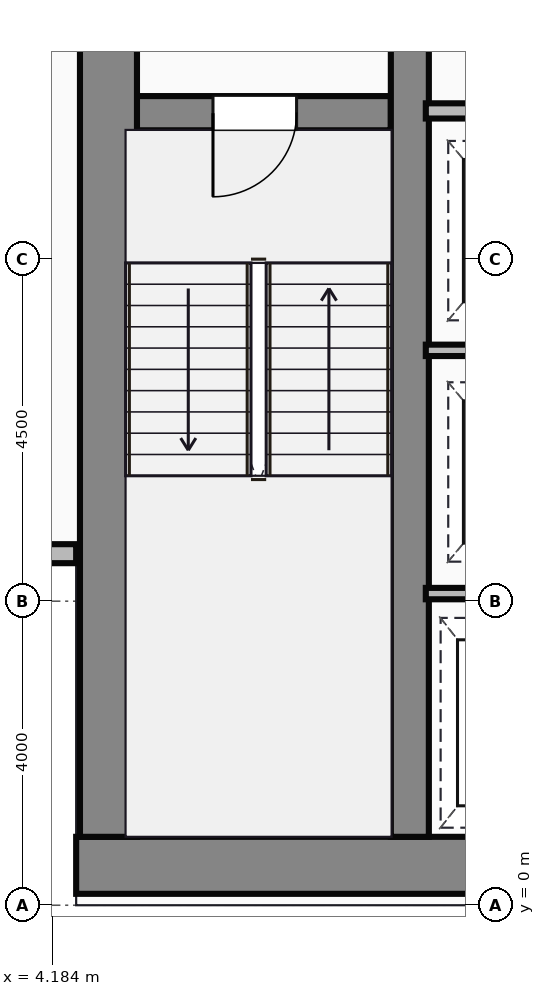
"""IFC4 building model, lengths in metres.
Left out: names, types, materials, properties, quantities, classifications, styles, units other than length and angle.
Written with IfcOpenShell. Run it as: python <this file> out.ifc"""

import sys

from ifc_helpers import new_model, si_unit, direction, frame, frame_2d, origin, place, context, subcontext, project, spatial, rectangle, extrude, source, transform, mapped, element, fill, save


model = new_model("IFC4")
c1 = context("Model", 3, precision=1e-05, world=origin(), true_north=direction((0.0, 1.0)))
c2 = subcontext(c1, "Body", "Model", "MODEL_VIEW")
j1 = project(units=[si_unit("LENGTHUNIT", "METRE"), si_unit("PLANEANGLEUNIT", "RADIAN")], contexts=[c1])
p1 = place(None, origin())
s1 = spatial("IfcSite", under=j1, at=p1, CompositionType="ELEMENT")
p2 = place(p1, origin())
s2 = spatial("IfcBuilding", under=s1, at=p2, CompositionType="ELEMENT")
p3 = place(p2, frame((0.0, 0.0, 114.2)))
s3 = spatial("IfcBuildingStorey", under=s2, at=p3, CompositionType="ELEMENT", Elevation=114.2)
m1 = source(origin(), c2, "Body", "SweptSolid", [
    extrude(rectangle(XDim=29.5, YDim=0.75, at=frame_2d((14.75, 0.0))), origin(), (0.0, 0.0, 1.0), 3.65),
])
p4 = place(p3, frame((4.5, 0.525, 0.0), z_axis=(0.0, 0.0, 1.0), x_axis=(1.0, 0.0, 0.0)))
e1 = element("IfcWall", 1, at=p4, inside=s3, PredefinedType="SHEAR", context=c2, shape_type="MappedRepresentation", body=[
    mapped(m1, transform((0.0, 0.0, 0.0))),
])
m2 = source(origin(), c2, "Body", "SweptSolid", [
    extrude(rectangle(XDim=13.1, YDim=0.75, at=frame_2d((6.55, 0.0))), origin(), (0.0, 0.0, 1.0), 3.65),
])
p5 = place(p3, frame((4.925, 0.9, 0.0), z_axis=(0.0, 0.0, 1.0), x_axis=(0.0, 1.0, 0.0)))
e2 = element("IfcWall", 2, at=p5, inside=s3, PredefinedType="SHEAR", context=c2, shape_type="MappedRepresentation", body=[
    mapped(m2, transform((0.0, 0.0, 0.0))),
])
m3 = source(origin(), c2, "Body", "SweptSolid", [
    extrude(rectangle(XDim=12.35, YDim=0.5, at=frame_2d((6.175, 0.0))), origin(), (0.0, 0.0, 1.0), 3.65),
])
p6 = place(p3, frame((8.89, 0.9, 0.0), z_axis=(0.0, 0.0, 1.0), x_axis=(0.0, 1.0, 0.0)))
e3 = element("IfcWall", 3, at=p6, inside=s3, PredefinedType="SHEAR", context=c2, shape_type="MappedRepresentation", body=[
    mapped(m3, transform((0.0, 0.0, 0.0))),
])
m4 = source(origin(), c2, "Body", "SweptSolid", [
    extrude(rectangle(XDim=3.39, YDim=0.45, at=frame_2d((1.695, 0.0))), origin(), (0.0, 0.0, 1.0), 3.65),
])
p7 = place(p3, frame((5.25, 10.42, 0.0), z_axis=(0.0, 0.0, 1.0), x_axis=(1.0, 0.0, 0.0)))
e4 = element("IfcWall", 4, at=p7, inside=s3, PredefinedType="SHEAR", context=c2, shape_type="MappedRepresentation", body=[
    mapped(m4, transform((0.0, 0.0, 0.0))),
])
p8 = place(p7, frame((1.05, 0.0, 0.0)))
e5 = element("IfcOpeningElement", 5, at=p8, cuts=e4, PredefinedType="OPENING", context=c2, shape_type="SweptSolid", body=[
    extrude(rectangle(XDim=1.1, YDim=2.15, at=frame_2d((0.55, 1.075))), frame((0.0, 0.235, 0.0), z_axis=(0.0, -1.0, 0.0), x_axis=(1.0, 0.0, 0.0)), (0.0, 0.0, 1.0), 0.47),
])
m5 = source(origin(), c2, "Body", "SweptSolid", [
    extrude(rectangle(XDim=4.5, YDim=0.25, at=frame_2d((2.25, 0.0))), origin(), (0.0, 0.0, 1.0), 3.4),
])
p9 = place(p3, frame((0.0, 4.625, 0.0), z_axis=(0.0, 0.0, 1.0), x_axis=(1.0, 0.0, 0.0)))
e6 = element("IfcWall", 6, at=p9, inside=s3, PredefinedType="STANDARD", context=c2, shape_type="MappedRepresentation", body=[
    mapped(m5, transform((0.0, 0.0, 0.0))),
])
m6 = source(origin(), c2, "Body", "SweptSolid", [
    extrude(rectangle(XDim=2.35, YDim=0.2, at=frame_2d((1.175, 0.0))), origin(), (0.0, 0.0, 1.0), 3.4),
])
p10 = place(p3, frame((9.1, 10.45, 0.0), z_axis=(0.0, 0.0, 1.0), x_axis=(1.0, 0.0, 0.0)))
e7 = element("IfcWall", 7, at=p10, inside=s3, PredefinedType="PARTITIONING", context=c2, shape_type="MappedRepresentation", body=[
    mapped(m6, transform((0.0, 0.0, 0.0))),
])
p11 = place(p10, frame((0.55, 0.0, 0.0)))
e8 = element("IfcOpeningElement", 8, at=p11, cuts=e7, PredefinedType="OPENING", context=c2, shape_type="SweptSolid", body=[
    extrude(rectangle(XDim=1.1, YDim=2.15, at=frame_2d((0.55, 1.075))), frame((0.0, 0.11, 0.0), z_axis=(0.0, -1.0, 0.0), x_axis=(1.0, 0.0, 0.0)), (0.0, 0.0, 1.0), 0.22),
])
m7 = source(origin(), c2, "Body", "SweptSolid", [
    extrude(rectangle(XDim=2.4, YDim=0.15, at=frame_2d((1.2, 0.0))), origin(), (0.0, 0.0, 1.0), 3.4),
])
for number, where, z_axis, x_axis in (
    (9, (9.1, 4.1, 0.0), (0.0, 0.0, 1.0), (1.0, 0.0, 0.0)),
    (10, (9.1, 7.3, 0.0), (0.0, 0.0, 1.0), (1.0, 0.0, 0.0)),
):
    element("IfcWall", number, at=place(p3, frame(where, z_axis=z_axis, x_axis=x_axis)), inside=s3, PredefinedType="PARTITIONING", context=c2, shape_type="MappedRepresentation", body=[
        mapped(m7, transform((0.0, 0.0, 0.0))),
    ])
m8 = source(origin(), c2, "Body", "SweptSolid", [
    extrude(rectangle(XDim=1.1, YDim=2.15, at=frame_2d((0.55, 1.075))), frame((0.0, 0.025, 0.0), z_axis=(0.0, -1.0, 0.0), x_axis=(1.0, 0.0, 0.0)), (0.0, 0.0, 1.0), 0.05),
])
p12 = place(p8, frame((1.1, 0.0, 0.0), z_axis=(0.0, 0.0, 1.0), x_axis=(-1.0, 0.0, 0.0)))
e11 = element("IfcDoor", 11, at=p12, inside=s3, OperationType="SINGLE_SWING_LEFT", PredefinedType="DOOR", context=c2, shape_type="MappedRepresentation", body=[
    mapped(m8, transform((0.0, 0.0, 0.0))),
])
fill(e5, e11)
save(model, sys.argv[1])
